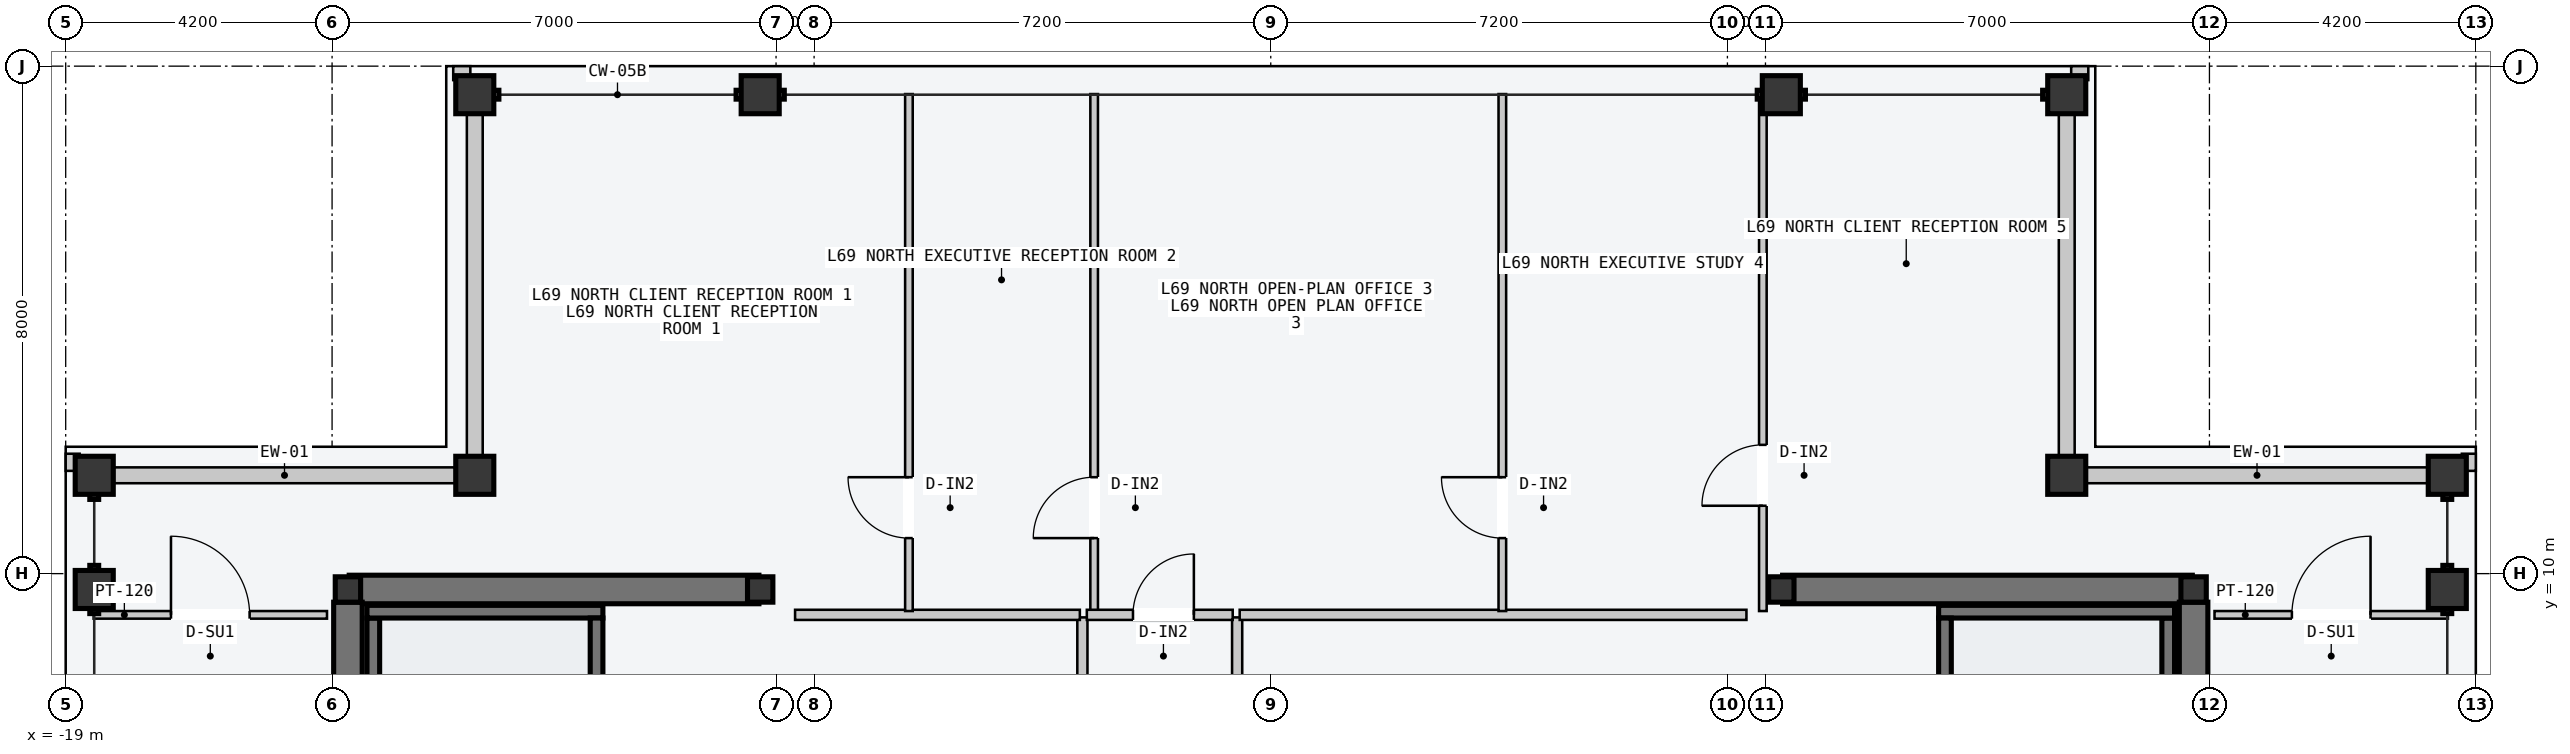
"""IFC4 building model, lengths in metres.
Left out: names, types, materials, properties, quantities, classifications, styles, units other than length and angle.
Written with IfcOpenShell. Run it as: python <this file> out.ifc"""

import sys

from ifc_helpers import new_model, si_unit, direction, frame, frame_2d, origin, origin_2d, place, context, subcontext, project, spatial, rectangle, hollow_rectangle, i_section, extrude, element, fill, save


model = new_model("IFC4")
c1 = context("Model", 3, precision=1e-05, world=origin(), true_north=direction((0.0, 1.0)))
c2 = subcontext(c1, "Body", "Model", "MODEL_VIEW")
j1 = project(units=[si_unit("LENGTHUNIT", "METRE"), si_unit("PLANEANGLEUNIT", "RADIAN")], contexts=[c1])
p1 = place(None, origin())
s1 = spatial("IfcSite", under=j1, at=p1, CompositionType="ELEMENT")
p2 = place(p1, origin())
s2 = spatial("IfcBuilding", under=s1, at=p2, CompositionType="ELEMENT")
p3 = place(p2, frame((0.0, 0.0, 261.6)))
s3 = spatial("IfcBuildingStorey", under=s2, at=p3, CompositionType="ELEMENT", Elevation=261.6)
p4 = place(p3, frame((-14.53, 9.75, -0.2), z_axis=(0.0, 0.0, 1.0), x_axis=(1.0, 0.0, 0.0)))
e1 = element("IfcWall", 1, at=p4, inside=s3, PredefinedType="SHEAR", context=c2, shape_type="SweptSolid", body=[
    extrude(rectangle(XDim=6.46, YDim=0.45, at=frame_2d((3.23, 0.0))), origin(), (0.0, 0.0, 1.0), 3.6),
])
p5 = place(p3, frame((-14.55, 0.2, -0.2), z_axis=(0.0, 0.0, 1.0), x_axis=(0.0, 1.0, 0.0)))
e2 = element("IfcWall", 2, at=p5, inside=s3, PredefinedType="SHEAR", context=c2, shape_type="SweptSolid", body=[
    extrude(rectangle(XDim=9.35, YDim=0.45, at=frame_2d((4.675, 0.0))), origin(), (0.0, 0.0, 1.0), 3.6),
])
p6 = place(p3, frame((8.07, 9.75, -0.2), z_axis=(0.0, 0.0, 1.0), x_axis=(1.0, 0.0, 0.0)))
e3 = element("IfcWall", 3, at=p6, inside=s3, PredefinedType="SHEAR", context=c2, shape_type="SweptSolid", body=[
    extrude(rectangle(XDim=6.46, YDim=0.45, at=frame_2d((3.23, 0.0))), origin(), (0.0, 0.0, 1.0), 3.6),
])
p7 = place(p3, frame((14.55, 0.2, -0.2), z_axis=(0.0, 0.0, 1.0), x_axis=(0.0, 1.0, 0.0)))
e4 = element("IfcWall", 4, at=p7, inside=s3, PredefinedType="SHEAR", context=c2, shape_type="SweptSolid", body=[
    extrude(rectangle(XDim=9.35, YDim=0.45, at=frame_2d((4.675, 0.0))), origin(), (0.0, 0.0, 1.0), 3.6),
])
for number, where, z_axis, x_axis in (
    (5, (-14.15, 1.5, -0.2), (0.0, 0.0, 1.0), (0.0, 1.0, 0.0)),
    (6, (14.15, 1.5, -0.2), (0.0, 0.0, 1.0), (0.0, 1.0, 0.0)),
):
    element("IfcWall", number, at=place(p3, frame(where, z_axis=z_axis, x_axis=x_axis)), inside=s3, PredefinedType="SOLIDWALL", context=c2, shape_type="SweptSolid", body=[
        extrude(rectangle(XDim=7.8, YDim=0.2, at=frame_2d((3.9, 0.0))), origin(), (0.0, 0.0, 1.0), 3.6),
    ])
p8 = place(p3, frame((-14.25, 9.4, -0.2), z_axis=(0.0, 0.0, 1.0), x_axis=(1.0, 0.0, 0.0)))
e7 = element("IfcWall", 7, at=p8, inside=s3, PredefinedType="SOLIDWALL", context=c2, shape_type="SweptSolid", body=[
    extrude(rectangle(XDim=3.72, YDim=0.2, at=frame_2d((1.86, 0.0))), origin(), (0.0, 0.0, 1.0), 3.6),
])
p9 = place(p3, frame((-10.63, 1.5, -0.2), z_axis=(0.0, 0.0, 1.0), x_axis=(0.0, 1.0, 0.0)))
e8 = element("IfcWall", 8, at=p9, inside=s3, PredefinedType="SOLIDWALL", context=c2, shape_type="SweptSolid", body=[
    extrude(rectangle(XDim=7.8, YDim=0.2, at=frame_2d((3.9, 0.0))), origin(), (0.0, 0.0, 1.0), 3.6),
])
p10 = place(p3, frame((10.53, 9.4, -0.2), z_axis=(0.0, 0.0, 1.0), x_axis=(1.0, 0.0, 0.0)))
e9 = element("IfcWall", 9, at=p10, inside=s3, PredefinedType="SOLIDWALL", context=c2, shape_type="SweptSolid", body=[
    extrude(rectangle(XDim=3.72, YDim=0.2, at=frame_2d((1.86, 0.0))), origin(), (0.0, 0.0, 1.0), 3.6),
])
p11 = place(p3, frame((10.63, 1.5, -0.2), z_axis=(0.0, 0.0, 1.0), x_axis=(0.0, 1.0, 0.0)))
e10 = element("IfcWall", 10, at=p11, inside=s3, PredefinedType="SOLIDWALL", context=c2, shape_type="SweptSolid", body=[
    extrude(rectangle(XDim=7.8, YDim=0.2, at=frame_2d((3.9, 0.0))), origin(), (0.0, 0.0, 1.0), 3.6),
])
for number, where, z_axis, x_axis in (
    (11, (-14.55, 9.75, 0.0), (0.0, 0.0, 1.0), (1.0, 0.0, 0.0)),
    (12, (-8.05, 9.75, 0.0), (0.0, 0.0, 1.0), (1.0, 0.0, 0.0)),
    (13, (8.05, 9.75, 0.0), (0.0, 0.0, 1.0), (1.0, 0.0, 0.0)),
    (14, (14.55, 9.75, 0.0), (0.0, 0.0, 1.0), (1.0, 0.0, 0.0)),
):
    element("IfcColumn", number, at=place(p3, frame(where, z_axis=z_axis, x_axis=x_axis)), inside=s3, PredefinedType="COLUMN", context=c2, shape_type="SweptSolid", body=[
        extrude(i_section(OverallWidth=0.4, OverallDepth=0.4, WebThickness=0.013, FlangeThickness=0.021, at=origin_2d()), origin(), (0.0, 0.0, 1.0), 3.6),
    ])
for number, where, z_axis, x_axis in (
    (15, (-12.55, 17.55, 0.0), (0.0, 0.0, 1.0), (1.0, 0.0, 0.0)),
    (16, (-8.05, 17.55, 0.0), (0.0, 0.0, 1.0), (1.0, 0.0, 0.0)),
    (17, (8.05, 17.55, 0.0), (0.0, 0.0, 1.0), (1.0, 0.0, 0.0)),
    (18, (12.55, 17.55, 0.0), (0.0, 0.0, 1.0), (1.0, 0.0, 0.0)),
    (19, (-18.55, 9.75, 0.0), (0.0, 0.0, 1.0), (0.0, 1.0, 0.0)),
    (20, (-18.55, 11.55, 0.0), (0.0, 0.0, 1.0), (0.0, 1.0, 0.0)),
    (21, (18.55, 9.75, 0.0), (0.0, 0.0, 1.0), (0.0, 1.0, 0.0)),
    (22, (18.55, 11.55, 0.0), (0.0, 0.0, 1.0), (0.0, 1.0, 0.0)),
    (23, (-12.55, 11.55, 0.0), (0.0, 0.0, 1.0), (1.0, 0.0, 0.0)),
    (24, (12.55, 11.55, 0.0), (0.0, 0.0, 1.0), (1.0, 0.0, 0.0)),
):
    element("IfcColumn", number, at=place(p3, frame(where, z_axis=z_axis, x_axis=x_axis)), inside=s3, PredefinedType="COLUMN", context=c2, shape_type="SweptSolid", body=[
        extrude(hollow_rectangle(XDim=0.6, YDim=0.6, WallThickness=0.025, at=origin_2d()), origin(), (0.0, 0.0, 1.0), 3.6),
    ])
for number, where, z_axis, x_axis in (
    (25, (-18.24, 11.55, 0.0), (0.0, 0.0, 1.0), (1.0, 0.0, 0.0)),
    (26, (-12.55, 11.86, 0.0), (0.0, 0.0, 1.0), (0.0, 1.0, 0.0)),
    (27, (12.86, 11.55, 0.0), (0.0, 0.0, 1.0), (1.0, 0.0, 0.0)),
    (28, (12.55, 11.86, 0.0), (0.0, 0.0, 1.0), (0.0, 1.0, 0.0)),
):
    element("IfcWall", number, at=place(p3, frame(where, z_axis=z_axis, x_axis=x_axis)), inside=s3, PredefinedType="STANDARD", context=c2, shape_type="SweptSolid", body=[
        extrude(rectangle(XDim=5.38, YDim=0.25, at=frame_2d((2.69, 0.0))), origin(), (0.0, 0.0, 1.0), 2.85),
    ])
for number, where, z_axis, x_axis in (
    (29, (-12.89, 17.89, 0.0), (0.0, 0.0, 1.0), (1.0, 0.0, 0.0)),
    (30, (-18.89, 11.62, 0.0), (0.0, 0.0, 1.0), (0.0, 1.0, 0.0)),
    (31, (12.62, 17.89, 0.0), (0.0, 0.0, 1.0), (1.0, 0.0, 0.0)),
    (32, (18.89, 11.62, 0.0), (0.0, 0.0, 1.0), (0.0, 1.0, 0.0)),
):
    element("IfcWall", number, at=place(p3, frame(where, z_axis=z_axis, x_axis=x_axis)), inside=s3, PredefinedType="PARAPET", context=c2, shape_type="SweptSolid", body=[
        extrude(rectangle(XDim=0.27, YDim=0.22, at=frame_2d((0.135, 0.0))), origin(), (0.0, 0.0, 1.0), 1.2),
    ])
p12 = place(p3, frame((-2.97, -3.5, 0.0), z_axis=(0.0, 0.0, 1.0), x_axis=(0.0, 1.0, 0.0)))
e33 = element("IfcWall", 33, at=p12, inside=s3, PredefinedType="PARTITIONING", context=c2, shape_type="SweptSolid", body=[
    extrude(rectangle(XDim=12.81, YDim=0.16, at=frame_2d((6.405, 0.0))), origin(), (0.0, 0.0, 1.0), 3.4),
])
p13 = place(p12, frame((6.1, 0.0, 0.0)))
e34 = element("IfcOpeningElement", 34, at=p13, cuts=e33, PredefinedType="OPENING", context=c2, shape_type="SweptSolid", body=[
    extrude(rectangle(XDim=1.24, YDim=2.24, at=frame_2d((0.62, 1.12))), frame((0.0, 0.09, 0.0), z_axis=(0.0, -1.0, 0.0), x_axis=(1.0, 0.0, 0.0)), (0.0, 0.0, 1.0), 0.18),
])
p14 = place(p12, frame((1.6, 0.0, 0.0)))
e35 = element("IfcOpeningElement", 35, at=p14, cuts=e33, PredefinedType="OPENING", context=c2, shape_type="SweptSolid", body=[
    extrude(rectangle(XDim=0.96, YDim=2.18, at=frame_2d((0.48, 1.09))), frame((0.0, 0.09, 0.0), z_axis=(0.0, -1.0, 0.0), x_axis=(1.0, 0.0, 0.0)), (0.0, 0.0, 1.0), 0.18),
])
p15 = place(p3, frame((-7.5, 9.35, 0.0), z_axis=(0.0, 0.0, 1.0), x_axis=(1.0, 0.0, 0.0)))
e36 = element("IfcWall", 36, at=p15, inside=s3, PredefinedType="PARTITIONING", context=c2, shape_type="SweptSolid", body=[
    extrude(rectangle(XDim=4.49, YDim=0.16, at=frame_2d((2.245, 0.0))), origin(), (0.0, 0.0, 1.0), 3.4),
])
p16 = place(p3, frame((-0.53, -3.5, 0.0), z_axis=(0.0, 0.0, 1.0), x_axis=(0.0, 1.0, 0.0)))
e37 = element("IfcWall", 37, at=p16, inside=s3, PredefinedType="PARTITIONING", context=c2, shape_type="SweptSolid", body=[
    extrude(rectangle(XDim=12.81, YDim=0.16, at=frame_2d((6.405, 0.0))), origin(), (0.0, 0.0, 1.0), 3.4),
])
p17 = place(p16, frame((6.1, 0.0, 0.0)))
e38 = element("IfcOpeningElement", 38, at=p17, cuts=e37, PredefinedType="OPENING", context=c2, shape_type="SweptSolid", body=[
    extrude(rectangle(XDim=1.24, YDim=2.24, at=frame_2d((0.62, 1.12))), frame((0.0, 0.09, 0.0), z_axis=(0.0, -1.0, 0.0), x_axis=(1.0, 0.0, 0.0)), (0.0, 0.0, 1.0), 0.18),
])
p18 = place(p16, frame((1.6, 0.0, 0.0)))
e39 = element("IfcOpeningElement", 39, at=p18, cuts=e37, PredefinedType="OPENING", context=c2, shape_type="SweptSolid", body=[
    extrude(rectangle(XDim=0.96, YDim=2.18, at=frame_2d((0.48, 1.09))), frame((0.0, 0.09, 0.0), z_axis=(0.0, -1.0, 0.0), x_axis=(1.0, 0.0, 0.0)), (0.0, 0.0, 1.0), 0.18),
])
p19 = place(p3, frame((-0.49, 9.35, 0.0), z_axis=(0.0, 0.0, 1.0), x_axis=(1.0, 0.0, 0.0)))
e40 = element("IfcWall", 40, at=p19, inside=s3, PredefinedType="PARTITIONING", context=c2, shape_type="SweptSolid", body=[
    extrude(rectangle(XDim=7.99, YDim=0.16, at=frame_2d((3.995, 0.0))), origin(), (0.0, 0.0, 1.0), 3.4),
])
p20 = place(p3, frame((-5.705, 9.41, 0.0), z_axis=(0.0, 0.0, 1.0), x_axis=(0.0, 1.0, 0.0)))
e41 = element("IfcWall", 41, at=p20, inside=s3, PredefinedType="PARTITIONING", context=c2, shape_type="SweptSolid", body=[
    extrude(rectangle(XDim=8.15, YDim=0.12, at=frame_2d((4.075, 0.0))), origin(), (0.0, 0.0, 1.0), 3.4),
])
p21 = place(p20, frame((1.15, 0.0, 0.0)))
e42 = element("IfcOpeningElement", 42, at=p21, cuts=e41, PredefinedType="OPENING", context=c2, shape_type="SweptSolid", body=[
    extrude(rectangle(XDim=0.96, YDim=2.18, at=frame_2d((0.48, 1.09))), frame((0.0, 0.07, 0.0), z_axis=(0.0, -1.0, 0.0), x_axis=(1.0, 0.0, 0.0)), (0.0, 0.0, 1.0), 0.14),
])
p22 = place(p3, frame((-2.785, 9.41, 0.0), z_axis=(0.0, 0.0, 1.0), x_axis=(0.0, 1.0, 0.0)))
e43 = element("IfcWall", 43, at=p22, inside=s3, PredefinedType="PARTITIONING", context=c2, shape_type="SweptSolid", body=[
    extrude(rectangle(XDim=8.15, YDim=0.12, at=frame_2d((4.075, 0.0))), origin(), (0.0, 0.0, 1.0), 3.4),
])
p23 = place(p22, frame((1.15, 0.0, 0.0)))
e44 = element("IfcOpeningElement", 44, at=p23, cuts=e43, PredefinedType="OPENING", context=c2, shape_type="SweptSolid", body=[
    extrude(rectangle(XDim=0.96, YDim=2.18, at=frame_2d((0.48, 1.09))), frame((0.0, 0.07, 0.0), z_axis=(0.0, -1.0, 0.0), x_axis=(1.0, 0.0, 0.0)), (0.0, 0.0, 1.0), 0.14),
])
p24 = place(p3, frame((3.651, 9.41, 0.0), z_axis=(0.0, 0.0, 1.0), x_axis=(0.0, 1.0, 0.0)))
e45 = element("IfcWall", 45, at=p24, inside=s3, PredefinedType="PARTITIONING", context=c2, shape_type="SweptSolid", body=[
    extrude(rectangle(XDim=8.15, YDim=0.12, at=frame_2d((4.075, 0.0))), origin(), (0.0, 0.0, 1.0), 3.4),
])
p25 = place(p24, frame((1.15, 0.0, 0.0)))
e46 = element("IfcOpeningElement", 46, at=p25, cuts=e45, PredefinedType="OPENING", context=c2, shape_type="SweptSolid", body=[
    extrude(rectangle(XDim=0.96, YDim=2.18, at=frame_2d((0.48, 1.09))), frame((0.0, 0.07, 0.0), z_axis=(0.0, -1.0, 0.0), x_axis=(1.0, 0.0, 0.0)), (0.0, 0.0, 1.0), 0.14),
])
p26 = place(p3, frame((7.759, 9.41, 0.0), z_axis=(0.0, 0.0, 1.0), x_axis=(0.0, 1.0, 0.0)))
e47 = element("IfcWall", 47, at=p26, inside=s3, PredefinedType="PARTITIONING", context=c2, shape_type="SweptSolid", body=[
    extrude(rectangle(XDim=8.15, YDim=0.12, at=frame_2d((4.075, 0.0))), origin(), (0.0, 0.0, 1.0), 3.4),
])
p27 = place(p26, frame((1.66, 0.0, 0.0)))
e48 = element("IfcOpeningElement", 48, at=p27, cuts=e47, PredefinedType="OPENING", context=c2, shape_type="SweptSolid", body=[
    extrude(rectangle(XDim=0.96, YDim=2.18, at=frame_2d((0.48, 1.09))), frame((0.0, 0.07, 0.0), z_axis=(0.0, -1.0, 0.0), x_axis=(1.0, 0.0, 0.0)), (0.0, 0.0, 1.0), 0.14),
])
p28 = place(p3, frame((-2.9, 9.35, 0.0), z_axis=(0.0, 0.0, 1.0), x_axis=(1.0, 0.0, 0.0)))
e49 = element("IfcWall", 49, at=p28, inside=s3, PredefinedType="PARTITIONING", context=c2, shape_type="SweptSolid", body=[
    extrude(rectangle(XDim=2.3, YDim=0.16, at=frame_2d((1.15, 0.0))), origin(), (0.0, 0.0, 1.0), 3.4),
])
p29 = place(p28, frame((0.728, 0.0, 0.0)))
e50 = element("IfcOpeningElement", 50, at=p29, cuts=e49, PredefinedType="OPENING", context=c2, shape_type="SweptSolid", body=[
    extrude(rectangle(XDim=0.96, YDim=2.18, at=frame_2d((0.48, 1.09))), frame((0.0, 0.09, 0.0), z_axis=(0.0, -1.0, 0.0), x_axis=(1.0, 0.0, 0.0)), (0.0, 0.0, 1.0), 0.18),
])
p30 = place(p3, frame((-18.56, 9.35, 0.0), z_axis=(0.0, 0.0, 1.0), x_axis=(1.0, 0.0, 0.0)))
e51 = element("IfcWall", 51, at=p30, inside=s3, PredefinedType="PARTITIONING", context=c2, shape_type="SweptSolid", body=[
    extrude(rectangle(XDim=3.68, YDim=0.12, at=frame_2d((1.84, 0.0))), origin(), (0.0, 0.0, 1.0), 3.4),
])
p31 = place(p30, frame((1.22, 0.0, 0.0)))
e52 = element("IfcOpeningElement", 52, at=p31, cuts=e51, PredefinedType="OPENING", context=c2, shape_type="SweptSolid", body=[
    extrude(rectangle(XDim=1.24, YDim=2.24, at=frame_2d((0.62, 1.12))), frame((0.0, 0.07, 0.0), z_axis=(0.0, -1.0, 0.0), x_axis=(1.0, 0.0, 0.0)), (0.0, 0.0, 1.0), 0.14),
])
p32 = place(p3, frame((14.88, 9.35, 0.0), z_axis=(0.0, 0.0, 1.0), x_axis=(1.0, 0.0, 0.0)))
e53 = element("IfcWall", 53, at=p32, inside=s3, PredefinedType="PARTITIONING", context=c2, shape_type="SweptSolid", body=[
    extrude(rectangle(XDim=3.68, YDim=0.12, at=frame_2d((1.84, 0.0))), origin(), (0.0, 0.0, 1.0), 3.4),
])
p33 = place(p32, frame((1.22, 0.0, 0.0)))
e54 = element("IfcOpeningElement", 54, at=p33, cuts=e53, PredefinedType="OPENING", context=c2, shape_type="SweptSolid", body=[
    extrude(rectangle(XDim=1.24, YDim=2.24, at=frame_2d((0.62, 1.12))), frame((0.0, 0.07, 0.0), z_axis=(0.0, -1.0, 0.0), x_axis=(1.0, 0.0, 0.0)), (0.0, 0.0, 1.0), 0.14),
])
p34 = place(p21, origin())
e55 = element("IfcDoor", 55, at=p34, inside=s3, OperationType="SINGLE_SWING_RIGHT", PredefinedType="DOOR", context=c2, shape_type="SweptSolid", body=[
    extrude(rectangle(XDim=0.96, YDim=2.18, at=frame_2d((0.48, 1.09))), frame((0.0, 0.025, 0.0), z_axis=(0.0, -1.0, 0.0), x_axis=(1.0, 0.0, 0.0)), (0.0, 0.0, 1.0), 0.05),
])
fill(e42, e55)
p35 = place(p23, origin())
e56 = element("IfcDoor", 56, at=p35, inside=s3, OperationType="SINGLE_SWING_LEFT", PredefinedType="DOOR", context=c2, shape_type="SweptSolid", body=[
    extrude(rectangle(XDim=0.96, YDim=2.18, at=frame_2d((0.48, 1.09))), frame((0.0, 0.025, 0.0), z_axis=(0.0, -1.0, 0.0), x_axis=(1.0, 0.0, 0.0)), (0.0, 0.0, 1.0), 0.05),
])
fill(e44, e56)
p36 = place(p25, origin())
e57 = element("IfcDoor", 57, at=p36, inside=s3, OperationType="SINGLE_SWING_RIGHT", PredefinedType="DOOR", context=c2, shape_type="SweptSolid", body=[
    extrude(rectangle(XDim=0.96, YDim=2.18, at=frame_2d((0.48, 1.09))), frame((0.0, 0.025, 0.0), z_axis=(0.0, -1.0, 0.0), x_axis=(1.0, 0.0, 0.0)), (0.0, 0.0, 1.0), 0.05),
])
fill(e46, e57)
p37 = place(p27, origin())
e58 = element("IfcDoor", 58, at=p37, inside=s3, OperationType="SINGLE_SWING_LEFT", PredefinedType="DOOR", context=c2, shape_type="SweptSolid", body=[
    extrude(rectangle(XDim=0.96, YDim=2.18, at=frame_2d((0.48, 1.09))), frame((0.0, 0.025, 0.0), z_axis=(0.0, -1.0, 0.0), x_axis=(1.0, 0.0, 0.0)), (0.0, 0.0, 1.0), 0.05),
])
fill(e48, e58)
p38 = place(p29, origin())
e59 = element("IfcDoor", 59, at=p38, inside=s3, OperationType="SINGLE_SWING_RIGHT", PredefinedType="DOOR", context=c2, shape_type="SweptSolid", body=[
    extrude(rectangle(XDim=0.96, YDim=2.18, at=frame_2d((0.48, 1.09))), frame((0.0, 0.025, 0.0), z_axis=(0.0, -1.0, 0.0), x_axis=(1.0, 0.0, 0.0)), (0.0, 0.0, 1.0), 0.05),
])
fill(e50, e59)
p39 = place(p31, origin())
e60 = element("IfcDoor", 60, at=p39, inside=s3, OperationType="SINGLE_SWING_LEFT", PredefinedType="DOOR", context=c2, shape_type="SweptSolid", body=[
    extrude(rectangle(XDim=1.24, YDim=2.24, at=frame_2d((0.62, 1.12))), frame((0.0, 0.025, 0.0), z_axis=(0.0, -1.0, 0.0), x_axis=(1.0, 0.0, 0.0)), (0.0, 0.0, 1.0), 0.05),
])
fill(e52, e60)
p40 = place(p33, origin())
e61 = element("IfcDoor", 61, at=p40, inside=s3, OperationType="SINGLE_SWING_RIGHT", PredefinedType="DOOR", context=c2, shape_type="SweptSolid", body=[
    extrude(rectangle(XDim=1.24, YDim=2.24, at=frame_2d((0.62, 1.12))), frame((0.0, 0.025, 0.0), z_axis=(0.0, -1.0, 0.0), x_axis=(1.0, 0.0, 0.0)), (0.0, 0.0, 1.0), 0.05),
])
fill(e54, e61)
save(model, sys.argv[1])
